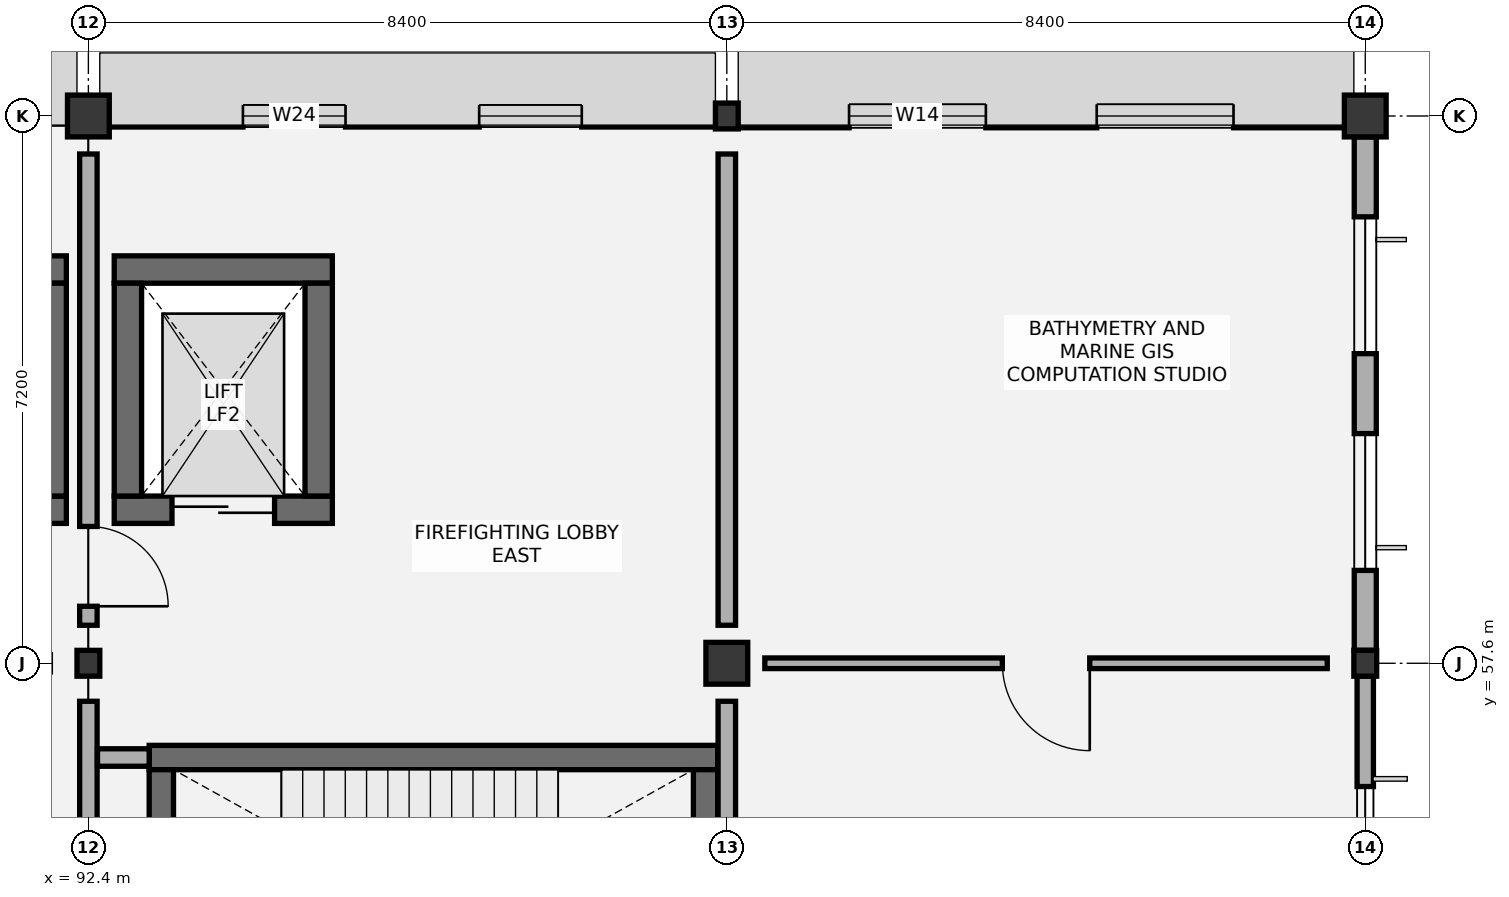
"""IFC4 building model, lengths in metres.
Left out: names, types, materials, properties, quantities, classifications, styles, units other than length and angle.
Written with IfcOpenShell. Run it as: python <this file> out.ifc"""

import sys

from ifc_helpers import new_model, si_unit, direction, frame, frame_2d, origin, origin_2d, place, context, subcontext, project, spatial, rectangle, i_section, extrude, element, fill, save


model = new_model("IFC4")
c1 = context("Model", 3, precision=1e-05, world=origin(), true_north=direction((0.0, 1.0)))
c2 = subcontext(c1, "Body", "Model", "MODEL_VIEW")
j1 = project(units=[si_unit("LENGTHUNIT", "METRE"), si_unit("PLANEANGLEUNIT", "RADIAN")], contexts=[c1])
p1 = place(None, origin())
s1 = spatial("IfcSite", under=j1, at=p1, CompositionType="ELEMENT")
p2 = place(p1, origin())
s2 = spatial("IfcBuilding", under=s1, at=p2, CompositionType="ELEMENT")
p3 = place(p2, frame((0.0, 0.0, 64.8)))
s3 = spatial("IfcBuildingStorey", under=s2, at=p3, CompositionType="ELEMENT", Elevation=64.8)
p4 = place(p3, frame((92.4, 57.6, 0.0), z_axis=(0.0, 0.0, 1.0), x_axis=(1.0, 0.0, 0.0)))
e1 = element("IfcColumn", 1, at=p4, inside=s3, PredefinedType="COLUMN", context=c2, shape_type="SweptSolid", body=[
    extrude(i_section(OverallWidth=0.3, OverallDepth=0.34, WebThickness=0.012, FlangeThickness=0.021, FilletRadius=0.027, at=origin_2d()), origin(), (0.0, 0.0, 1.0), 4.2),
])
for number, where, z_axis, x_axis in (
    (2, (92.4, 64.8, 0.0), (0.0, 0.0, 1.0), (1.0, 0.0, 0.0)),
    (3, (100.8, 57.6, 0.0), (0.0, 0.0, 1.0), (1.0, 0.0, 0.0)),
):
    element("IfcColumn", number, at=place(p3, frame(where, z_axis=z_axis, x_axis=x_axis)), inside=s3, PredefinedType="COLUMN", context=c2, shape_type="SweptSolid", body=[
        extrude(rectangle(XDim=0.55, YDim=0.55, at=origin_2d()), origin(), (0.0, 0.0, 1.0), 4.2),
    ])
for number, where, z_axis, x_axis in (
    (4, (100.8, 64.8, 0.0), (0.0, 0.0, 1.0), (1.0, 0.0, 0.0)),
    (5, (109.2, 57.6, 0.0), (0.0, 0.0, 1.0), (1.0, 0.0, 0.0)),
):
    element("IfcColumn", number, at=place(p3, frame(where, z_axis=z_axis, x_axis=x_axis)), inside=s3, PredefinedType="COLUMN", context=c2, shape_type="SweptSolid", body=[
        extrude(i_section(OverallWidth=0.3, OverallDepth=0.34, WebThickness=0.012, FlangeThickness=0.021, FilletRadius=0.027, at=origin_2d()), origin(), (0.0, 0.0, 1.0), 4.2),
    ])
p5 = place(p3, frame((109.2, 64.8, 0.0), z_axis=(0.0, 0.0, 1.0), x_axis=(1.0, 0.0, 0.0)))
e6 = element("IfcColumn", 6, at=p5, inside=s3, PredefinedType="COLUMN", context=c2, shape_type="SweptSolid", body=[
    extrude(rectangle(XDim=0.55, YDim=0.55, at=origin_2d()), origin(), (0.0, 0.0, 1.0), 4.2),
])
p6 = place(p3, frame((93.2, 56.36, 0.0), z_axis=(0.0, 0.0, 1.0), x_axis=(1.0, 0.0, 0.0)))
e7 = element("IfcWall", 7, at=p6, inside=s3, PredefinedType="SHEAR", context=c2, shape_type="SweptSolid", body=[
    extrude(rectangle(XDim=7.48, YDim=0.32, at=frame_2d((3.74, 0.0))), origin(), (0.0, 0.0, 1.0), 3.9),
])
for number, where, z_axis, x_axis in (
    (8, (93.36, 52.4, 0.0), (0.0, 0.0, 1.0), (0.0, 1.0, 0.0)),
    (9, (100.52, 52.4, 0.0), (0.0, 0.0, 1.0), (0.0, 1.0, 0.0)),
):
    element("IfcWall", number, at=place(p3, frame(where, z_axis=z_axis, x_axis=x_axis)), inside=s3, PredefinedType="SHEAR", context=c2, shape_type="SweptSolid", body=[
        extrude(rectangle(XDim=3.8, YDim=0.32, at=frame_2d((1.9, 0.0))), origin(), (0.0, 0.0, 1.0), 3.9),
    ])
p7 = place(p3, frame((84.34, 62.78, 0.0), z_axis=(0.0, 0.0, 1.0), x_axis=(1.0, 0.0, 0.0)))
e10 = element("IfcWall", 10, at=p7, inside=s3, PredefinedType="SHEAR", context=c2, shape_type="SweptSolid", body=[
    extrude(rectangle(XDim=7.77, YDim=0.36, at=frame_2d((3.885, 0.0))), origin(), (0.0, 0.0, 1.0), 3.9),
])
p8 = place(p3, frame((89.45, 59.62, 0.0), z_axis=(0.0, 0.0, 1.0), x_axis=(1.0, 0.0, 0.0)))
e11 = element("IfcWall", 11, at=p8, inside=s3, PredefinedType="SHEAR", context=c2, shape_type="SweptSolid", body=[
    extrude(rectangle(XDim=2.66, YDim=0.36, at=frame_2d((1.33, 0.0))), origin(), (0.0, 0.0, 1.0), 3.9),
])
p9 = place(p8, frame((0.78, 0.0, 0.0)))
e12 = element("IfcOpeningElement", 12, at=p9, cuts=e11, PredefinedType="OPENING", context=c2, shape_type="SweptSolid", body=[
    extrude(rectangle(XDim=1.1, YDim=2.15, at=frame_2d((0.55, 1.075))), frame((0.0, 0.19, 0.0), z_axis=(0.0, -1.0, 0.0), x_axis=(1.0, 0.0, 0.0)), (0.0, 0.0, 1.0), 0.38),
])
p10 = place(p3, frame((91.93, 59.8, 0.0), z_axis=(0.0, 0.0, 1.0), x_axis=(0.0, 1.0, 0.0)))
e13 = element("IfcWall", 13, at=p10, inside=s3, PredefinedType="SHEAR", context=c2, shape_type="SweptSolid", body=[
    extrude(rectangle(XDim=2.8, YDim=0.36, at=frame_2d((1.4, 0.0))), origin(), (0.0, 0.0, 1.0), 3.9),
])
p11 = place(p3, frame((92.74, 62.78, 0.0), z_axis=(0.0, 0.0, 1.0), x_axis=(1.0, 0.0, 0.0)))
e14 = element("IfcWall", 14, at=p11, inside=s3, PredefinedType="SHEAR", context=c2, shape_type="SweptSolid", body=[
    extrude(rectangle(XDim=2.87, YDim=0.36, at=frame_2d((1.435, 0.0))), origin(), (0.0, 0.0, 1.0), 3.9),
])
p12 = place(p3, frame((92.74, 59.62, 0.0), z_axis=(0.0, 0.0, 1.0), x_axis=(1.0, 0.0, 0.0)))
e15 = element("IfcWall", 15, at=p12, inside=s3, PredefinedType="SHEAR", context=c2, shape_type="SweptSolid", body=[
    extrude(rectangle(XDim=2.87, YDim=0.36, at=frame_2d((1.435, 0.0))), origin(), (0.0, 0.0, 1.0), 3.9),
])
p13 = place(p12, frame((0.76, 0.0, 0.0)))
e16 = element("IfcOpeningElement", 16, at=p13, cuts=e15, PredefinedType="OPENING", context=c2, shape_type="SweptSolid", body=[
    extrude(rectangle(XDim=1.35, YDim=2.2, at=frame_2d((0.675, 1.1))), frame((0.0, 0.19, 0.0), z_axis=(0.0, -1.0, 0.0), x_axis=(1.0, 0.0, 0.0)), (0.0, 0.0, 1.0), 0.38),
])
for number, where, z_axis, x_axis in (
    (17, (92.92, 59.8, 0.0), (0.0, 0.0, 1.0), (0.0, 1.0, 0.0)),
    (18, (95.43, 59.8, 0.0), (0.0, 0.0, 1.0), (0.0, 1.0, 0.0)),
):
    element("IfcWall", number, at=place(p3, frame(where, z_axis=z_axis, x_axis=x_axis)), inside=s3, PredefinedType="SHEAR", context=c2, shape_type="SweptSolid", body=[
        extrude(rectangle(XDim=2.8, YDim=0.36, at=frame_2d((1.4, 0.0))), origin(), (0.0, 0.0, 1.0), 3.9),
    ])
p14 = place(p3, frame((84.15, 64.8, 0.0), z_axis=(0.0, 0.0, 1.0), x_axis=(1.0, 0.0, 0.0)))
e19 = element("IfcWall", 19, at=p14, inside=s3, PredefinedType="SOLIDWALL", context=c2, shape_type="SweptSolid", body=[
    extrude(rectangle(XDim=7.975, YDim=0.215, at=frame_2d((3.988, 0.0))), origin(), (0.0, 0.0, 1.0), 3.345),
])
p15 = place(p14, frame((1.658, 0.0, 0.95)))
e20 = element("IfcOpeningElement", 20, at=p15, cuts=e19, PredefinedType="OPENING", context=c2, shape_type="SweptSolid", body=[
    extrude(rectangle(XDim=1.5, YDim=1.5, at=frame_2d((0.75, 0.75))), frame((0.0, 0.117, 0.0), z_axis=(0.0, -1.0, 0.0), x_axis=(1.0, 0.0, 0.0)), (0.0, 0.0, 1.0), 0.235),
])
p16 = place(p14, frame((4.817, 0.0, 0.95)))
e21 = element("IfcOpeningElement", 21, at=p16, cuts=e19, PredefinedType="OPENING", context=c2, shape_type="SweptSolid", body=[
    extrude(rectangle(XDim=1.5, YDim=1.5, at=frame_2d((0.75, 0.75))), frame((0.0, 0.117, 0.0), z_axis=(0.0, -1.0, 0.0), x_axis=(1.0, 0.0, 0.0)), (0.0, 0.0, 1.0), 0.235),
])
p17 = place(p3, frame((92.675, 64.8, 0.0), z_axis=(0.0, 0.0, 1.0), x_axis=(1.0, 0.0, 0.0)))
e22 = element("IfcWall", 22, at=p17, inside=s3, PredefinedType="SOLIDWALL", context=c2, shape_type="SweptSolid", body=[
    extrude(rectangle(XDim=7.975, YDim=0.29, at=frame_2d((3.987, 0.0))), origin(), (0.0, 0.0, 1.0), 3.345),
])
p18 = place(p17, frame((1.758, 0.0, 0.95)))
e23 = element("IfcOpeningElement", 23, at=p18, cuts=e22, PredefinedType="OPENING", context=c2, shape_type="SweptSolid", body=[
    extrude(rectangle(XDim=1.35, YDim=1.65, at=frame_2d((0.675, 0.825))), frame((0.0, 0.155, 0.0), z_axis=(0.0, -1.0, 0.0), x_axis=(1.0, 0.0, 0.0)), (0.0, 0.0, 1.0), 0.31),
])
p19 = place(p17, frame((4.867, 0.0, 0.95)))
e24 = element("IfcOpeningElement", 24, at=p19, cuts=e22, PredefinedType="OPENING", context=c2, shape_type="SweptSolid", body=[
    extrude(rectangle(XDim=1.35, YDim=1.65, at=frame_2d((0.675, 0.825))), frame((0.0, 0.155, 0.0), z_axis=(0.0, -1.0, 0.0), x_axis=(1.0, 0.0, 0.0)), (0.0, 0.0, 1.0), 0.31),
])
p20 = place(p3, frame((109.2, 50.675, 0.0), z_axis=(0.0, 0.0, 1.0), x_axis=(0.0, 1.0, 0.0)))
e25 = element("IfcWall", 25, at=p20, inside=s3, PredefinedType="SOLIDWALL", context=c2, shape_type="SweptSolid", body=[
    extrude(rectangle(XDim=6.755, YDim=0.215, at=frame_2d((3.377, 0.0))), origin(), (0.0, 0.0, 1.0), 3.345),
])
p21 = place(p20, frame((1.452, 0.0, 0.95)))
e26 = element("IfcOpeningElement", 26, at=p21, cuts=e25, PredefinedType="OPENING", context=c2, shape_type="SweptSolid", body=[
    extrude(rectangle(XDim=1.2, YDim=1.5, at=frame_2d((0.6, 0.75))), frame((0.0, 0.117, 0.0), z_axis=(0.0, -1.0, 0.0), x_axis=(1.0, 0.0, 0.0)), (0.0, 0.0, 1.0), 0.235),
])
p22 = place(p20, frame((4.103, 0.0, 0.95)))
e27 = element("IfcOpeningElement", 27, at=p22, cuts=e25, PredefinedType="OPENING", context=c2, shape_type="SweptSolid", body=[
    extrude(rectangle(XDim=1.2, YDim=1.5, at=frame_2d((0.6, 0.75))), frame((0.0, 0.117, 0.0), z_axis=(0.0, -1.0, 0.0), x_axis=(1.0, 0.0, 0.0)), (0.0, 0.0, 1.0), 0.235),
])
p23 = place(p3, frame((100.95, 64.8, 0.0), z_axis=(0.0, 0.0, 1.0), x_axis=(1.0, 0.0, 0.0)))
e28 = element("IfcWall", 28, at=p23, inside=s3, PredefinedType="SOLIDWALL", context=c2, shape_type="SweptSolid", body=[
    extrude(rectangle(XDim=7.975, YDim=0.31, at=frame_2d((3.988, 0.0))), origin(), (0.0, 0.0, 1.0), 3.445),
])
p24 = place(p23, frame((1.458, 0.0, 0.95)))
e29 = element("IfcOpeningElement", 29, at=p24, cuts=e28, PredefinedType="OPENING", context=c2, shape_type="SweptSolid", body=[
    extrude(rectangle(XDim=1.8, YDim=1.5, at=frame_2d((0.9, 0.75))), frame((0.0, 0.165, 0.0), z_axis=(0.0, -1.0, 0.0), x_axis=(1.0, 0.0, 0.0)), (0.0, 0.0, 1.0), 0.33),
])
p25 = place(p23, frame((4.717, 0.0, 0.95)))
e30 = element("IfcOpeningElement", 30, at=p25, cuts=e28, PredefinedType="OPENING", context=c2, shape_type="SweptSolid", body=[
    extrude(rectangle(XDim=1.8, YDim=1.5, at=frame_2d((0.9, 0.75))), frame((0.0, 0.165, 0.0), z_axis=(0.0, -1.0, 0.0), x_axis=(1.0, 0.0, 0.0)), (0.0, 0.0, 1.0), 0.33),
])
p26 = place(p3, frame((109.2, 57.77, 0.0), z_axis=(0.0, 0.0, 1.0), x_axis=(0.0, 1.0, 0.0)))
e31 = element("IfcWall", 31, at=p26, inside=s3, PredefinedType="SOLIDWALL", context=c2, shape_type="SweptSolid", body=[
    extrude(rectangle(XDim=6.755, YDim=0.29, at=frame_2d((3.377, 0.0))), origin(), (0.0, 0.0, 1.0), 3.445),
])
p27 = place(p26, frame((1.052, 0.0, 0.95)))
e32 = element("IfcOpeningElement", 32, at=p27, cuts=e31, PredefinedType="OPENING", context=c2, shape_type="SweptSolid", body=[
    extrude(rectangle(XDim=1.8, YDim=1.5, at=frame_2d((0.9, 0.75))), frame((0.0, 0.155, 0.0), z_axis=(0.0, -1.0, 0.0), x_axis=(1.0, 0.0, 0.0)), (0.0, 0.0, 1.0), 0.31),
])
p28 = place(p26, frame((3.903, 0.0, 0.95)))
e33 = element("IfcOpeningElement", 33, at=p28, cuts=e31, PredefinedType="OPENING", context=c2, shape_type="SweptSolid", body=[
    extrude(rectangle(XDim=1.8, YDim=1.5, at=frame_2d((0.9, 0.75))), frame((0.0, 0.155, 0.0), z_axis=(0.0, -1.0, 0.0), x_axis=(1.0, 0.0, 0.0)), (0.0, 0.0, 1.0), 0.31),
])
p29 = place(p3, frame((109.2, 64.92, 0.0), z_axis=(0.0, 0.0, 1.0), x_axis=(0.0, 1.0, 0.0)))
e34 = element("IfcWall", 34, at=p29, inside=s3, PredefinedType="PARAPET", context=c2, shape_type="SweptSolid", body=[
    extrude(rectangle(XDim=6.96, YDim=0.185, at=frame_2d((3.48, 0.0))), origin(), (0.0, 0.0, 1.0), 1.15),
])
p30 = place(p3, frame((92.4, 50.9, 0.0), z_axis=(0.0, 0.0, 1.0), x_axis=(0.0, 1.0, 0.0)))
e35 = element("IfcWall", 35, at=p30, inside=s3, PredefinedType="PARTITIONING", context=c2, shape_type="SweptSolid", body=[
    extrude(rectangle(XDim=6.2, YDim=0.23, at=frame_2d((3.1, 0.0))), origin(), (0.0, 0.0, 1.0), 3.605),
])
p31 = place(p30, frame((0.05, 0.0, 0.0)))
e36 = element("IfcOpeningElement", 36, at=p31, cuts=e35, PredefinedType="OPENING", context=c2, shape_type="SweptSolid", body=[
    extrude(rectangle(XDim=1.05, YDim=2.15, at=frame_2d((0.525, 1.075))), frame((0.0, 0.125, 0.0), z_axis=(0.0, -1.0, 0.0), x_axis=(1.0, 0.0, 0.0)), (0.0, 0.0, 1.0), 0.25),
])
p32 = place(p3, frame((92.4, 58.1, 0.0), z_axis=(0.0, 0.0, 1.0), x_axis=(0.0, 1.0, 0.0)))
e37 = element("IfcWall", 37, at=p32, inside=s3, PredefinedType="PARTITIONING", context=c2, shape_type="SweptSolid", body=[
    extrude(rectangle(XDim=6.2, YDim=0.23, at=frame_2d((3.1, 0.0))), origin(), (0.0, 0.0, 1.0), 3.395),
])
p33 = place(p32, frame((0.25, 0.0, 0.0)))
e38 = element("IfcOpeningElement", 38, at=p33, cuts=e37, PredefinedType="OPENING", context=c2, shape_type="SweptSolid", body=[
    extrude(rectangle(XDim=1.05, YDim=2.15, at=frame_2d((0.525, 1.075))), frame((0.0, 0.125, 0.0), z_axis=(0.0, -1.0, 0.0), x_axis=(1.0, 0.0, 0.0)), (0.0, 0.0, 1.0), 0.25),
])
p34 = place(p3, frame((100.8, 50.9, 0.0), z_axis=(0.0, 0.0, 1.0), x_axis=(0.0, 1.0, 0.0)))
e39 = element("IfcWall", 39, at=p34, inside=s3, PredefinedType="PARTITIONING", context=c2, shape_type="SweptSolid", body=[
    extrude(rectangle(XDim=6.2, YDim=0.23, at=frame_2d((3.1, 0.0))), origin(), (0.0, 0.0, 1.0), 3.395),
])
p35 = place(p3, frame((92.52, 56.36, 0.0), z_axis=(0.0, 0.0, 1.0), x_axis=(1.0, 0.0, 0.0)))
e40 = element("IfcWall", 40, at=p35, inside=s3, PredefinedType="PARTITIONING", context=c2, shape_type="SweptSolid", body=[
    extrude(rectangle(XDim=0.68, YDim=0.23, at=frame_2d((0.34, 0.0))), origin(), (0.0, 0.0, 1.0), 3.9),
])
p36 = place(p3, frame((100.8, 58.1, 0.0), z_axis=(0.0, 0.0, 1.0), x_axis=(0.0, 1.0, 0.0)))
e41 = element("IfcWall", 41, at=p36, inside=s3, PredefinedType="PARTITIONING", context=c2, shape_type="SweptSolid", body=[
    extrude(rectangle(XDim=6.2, YDim=0.23, at=frame_2d((3.1, 0.0))), origin(), (0.0, 0.0, 1.0), 3.395),
])
p37 = place(p3, frame((101.3, 57.6, 0.0), z_axis=(0.0, 0.0, 1.0), x_axis=(1.0, 0.0, 0.0)))
e42 = element("IfcWall", 42, at=p37, inside=s3, PredefinedType="PARTITIONING", context=c2, shape_type="SweptSolid", body=[
    extrude(rectangle(XDim=7.4, YDim=0.14, at=frame_2d((3.7, 0.0))), origin(), (0.0, 0.0, 1.0), 3.395),
])
p38 = place(p37, frame((3.125, 0.0, 0.0)))
e43 = element("IfcOpeningElement", 43, at=p38, cuts=e42, PredefinedType="OPENING", context=c2, shape_type="SweptSolid", body=[
    extrude(rectangle(XDim=1.15, YDim=2.1, at=frame_2d((0.575, 1.05))), frame((0.0, 0.08, 0.0), z_axis=(0.0, -1.0, 0.0), x_axis=(1.0, 0.0, 0.0)), (0.0, 0.0, 1.0), 0.16),
])
p39 = place(p18, origin())
e44 = element("IfcWindow", 44, at=p39, inside=s3, PartitioningType="SINGLE_PANEL", PredefinedType="WINDOW", context=c2, shape_type="SweptSolid", body=[
    extrude(rectangle(XDim=1.35, YDim=1.65, at=frame_2d((0.675, 0.825))), frame((0.0, 0.03, 0.0), z_axis=(0.0, -1.0, 0.0), x_axis=(1.0, 0.0, 0.0)), (0.0, 0.0, 1.0), 0.06),
])
fill(e23, e44)
p40 = place(p19, origin())
e45 = element("IfcWindow", 45, at=p40, inside=s3, PartitioningType="SINGLE_PANEL", PredefinedType="WINDOW", context=c2, shape_type="SweptSolid", body=[
    extrude(rectangle(XDim=1.35, YDim=1.65, at=frame_2d((0.675, 0.825))), frame((0.0, 0.03, 0.0), z_axis=(0.0, -1.0, 0.0), x_axis=(1.0, 0.0, 0.0)), (0.0, 0.0, 1.0), 0.06),
])
fill(e24, e45)
p41 = place(p22, origin())
e46 = element("IfcWindow", 46, at=p41, inside=s3, PartitioningType="SINGLE_PANEL", PredefinedType="WINDOW", context=c2, shape_type="SweptSolid", body=[
    extrude(rectangle(XDim=1.2, YDim=1.5, at=frame_2d((0.6, 0.75))), frame((0.0, 0.03, 0.0), z_axis=(0.0, -1.0, 0.0), x_axis=(1.0, 0.0, 0.0)), (0.0, 0.0, 1.0), 0.06),
])
fill(e27, e46)
p42 = place(p24, origin())
e47 = element("IfcWindow", 47, at=p42, inside=s3, PartitioningType="SINGLE_PANEL", PredefinedType="WINDOW", context=c2, shape_type="SweptSolid", body=[
    extrude(rectangle(XDim=1.8, YDim=1.5, at=frame_2d((0.9, 0.75))), frame((0.0, 0.03, 0.0), z_axis=(0.0, -1.0, 0.0), x_axis=(1.0, 0.0, 0.0)), (0.0, 0.0, 1.0), 0.06),
])
fill(e29, e47)
p43 = place(p25, origin())
e48 = element("IfcWindow", 48, at=p43, inside=s3, PartitioningType="SINGLE_PANEL", PredefinedType="WINDOW", context=c2, shape_type="SweptSolid", body=[
    extrude(rectangle(XDim=1.8, YDim=1.5, at=frame_2d((0.9, 0.75))), frame((0.0, 0.03, 0.0), z_axis=(0.0, -1.0, 0.0), x_axis=(1.0, 0.0, 0.0)), (0.0, 0.0, 1.0), 0.06),
])
fill(e30, e48)
p44 = place(p27, origin())
e49 = element("IfcWindow", 49, at=p44, inside=s3, PartitioningType="SINGLE_PANEL", PredefinedType="WINDOW", context=c2, shape_type="SweptSolid", body=[
    extrude(rectangle(XDim=1.8, YDim=1.5, at=frame_2d((0.9, 0.75))), frame((0.0, 0.03, 0.0), z_axis=(0.0, -1.0, 0.0), x_axis=(1.0, 0.0, 0.0)), (0.0, 0.0, 1.0), 0.06),
])
fill(e32, e49)
p45 = place(p28, origin())
e50 = element("IfcWindow", 50, at=p45, inside=s3, PartitioningType="SINGLE_PANEL", PredefinedType="WINDOW", context=c2, shape_type="SweptSolid", body=[
    extrude(rectangle(XDim=1.8, YDim=1.5, at=frame_2d((0.9, 0.75))), frame((0.0, 0.03, 0.0), z_axis=(0.0, -1.0, 0.0), x_axis=(1.0, 0.0, 0.0)), (0.0, 0.0, 1.0), 0.06),
])
fill(e33, e50)
p46 = place(p13, origin())
e51 = element("IfcDoor", 51, at=p46, inside=s3, OperationType="DOUBLE_DOOR_SLIDING", PredefinedType="DOOR", context=c2, shape_type="SweptSolid", body=[
    extrude(rectangle(XDim=1.35, YDim=2.2, at=frame_2d((0.675, 1.1))), frame((0.0, 0.025, 0.0), z_axis=(0.0, -1.0, 0.0), x_axis=(1.0, 0.0, 0.0)), (0.0, 0.0, 1.0), 0.05),
])
fill(e16, e51)
p47 = place(p33, frame((1.05, 0.0, 0.0), z_axis=(0.0, 0.0, 1.0), x_axis=(-1.0, 0.0, 0.0)))
e52 = element("IfcDoor", 52, at=p47, inside=s3, OperationType="SINGLE_SWING_RIGHT", PredefinedType="DOOR", context=c2, shape_type="SweptSolid", body=[
    extrude(rectangle(XDim=1.05, YDim=2.15, at=frame_2d((0.525, 1.075))), frame((0.0, 0.025, 0.0), z_axis=(0.0, -1.0, 0.0), x_axis=(1.0, 0.0, 0.0)), (0.0, 0.0, 1.0), 0.05),
])
fill(e38, e52)
p48 = place(p38, frame((1.15, 0.0, 0.0), z_axis=(0.0, 0.0, 1.0), x_axis=(-1.0, 0.0, 0.0)))
e53 = element("IfcDoor", 53, at=p48, inside=s3, OperationType="SINGLE_SWING_LEFT", PredefinedType="DOOR", context=c2, shape_type="SweptSolid", body=[
    extrude(rectangle(XDim=1.15, YDim=2.1, at=frame_2d((0.575, 1.05))), frame((0.0, 0.025, 0.0), z_axis=(0.0, -1.0, 0.0), x_axis=(1.0, 0.0, 0.0)), (0.0, 0.0, 1.0), 0.05),
])
fill(e43, e53)
save(model, sys.argv[1])
